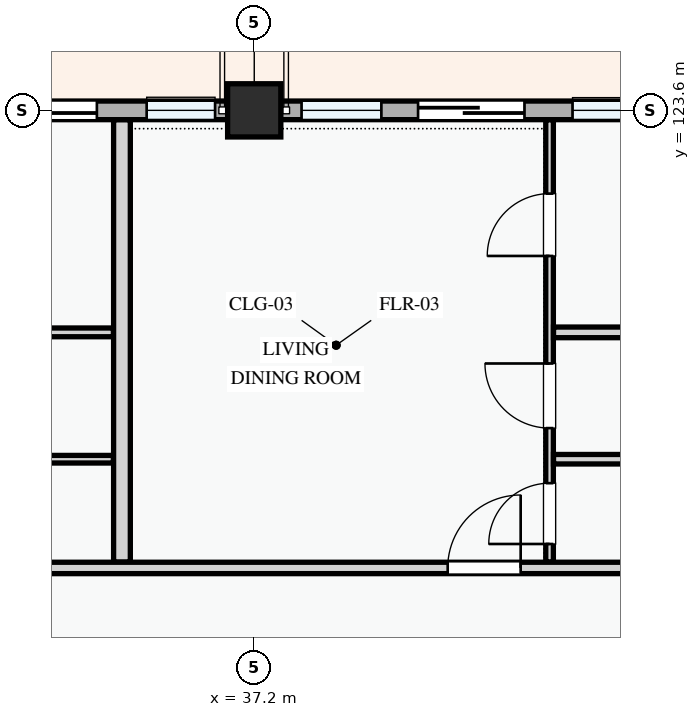
"""IFC4 building model, lengths in metres.
Left out: names, types, materials, properties, quantities, classifications, styles, units other than length and angle.
Written with IfcOpenShell. Run it as: python <this file> out.ifc"""

import sys

from ifc_helpers import new_model, si_unit, direction, frame, frame_2d, origin, origin_2d, place, context, subcontext, project, spatial, rectangle, extrude, element, fill, save


model = new_model("IFC4")
c1 = context("Model", 3, precision=1e-05, world=origin(), true_north=direction((0.0, 1.0)))
c2 = subcontext(c1, "Body", "Model", "MODEL_VIEW")
j1 = project(units=[si_unit("LENGTHUNIT", "METRE"), si_unit("PLANEANGLEUNIT", "RADIAN")], contexts=[c1])
p1 = place(None, origin())
s1 = spatial("IfcSite", under=j1, at=p1, CompositionType="ELEMENT")
p2 = place(p1, origin())
s2 = spatial("IfcBuilding", under=s1, at=p2, CompositionType="ELEMENT")
p3 = place(p2, frame((0.0, 0.0, 8.1)))
s3 = spatial("IfcBuildingStorey", under=s2, at=p3, CompositionType="ELEMENT", Elevation=8.1)
p4 = place(p3, frame((37.2, 123.6, 0.0), z_axis=(0.0, 0.0, 1.0), x_axis=(1.0, 0.0, 0.0)))
e1 = element("IfcColumn", 1, at=p4, inside=s3, PredefinedType="COLUMN", context=c2, shape_type="SweptSolid", body=[
    extrude(rectangle(XDim=0.7, YDim=0.7, at=origin_2d()), origin(), (0.0, 0.0, 1.0), 3.3),
])
p5 = place(p3, frame((43.2, 123.6, 0.0), z_axis=(0.0, 0.0, 1.0), x_axis=(-1.0, 0.0, 0.0)))
e2 = element("IfcWall", 2, at=p5, inside=s3, PredefinedType="STANDARD", context=c2, shape_type="SweptSolid", body=[
    extrude(rectangle(XDim=6.0, YDim=0.245, at=frame_2d((3.0, 0.0))), origin(), (0.0, 0.0, 1.0), 2.445),
])
p6 = place(p5, frame((2.444, 0.0, 0.0)))
e3 = element("IfcOpeningElement", 3, at=p6, cuts=e2, PredefinedType="OPENING", context=c2, shape_type="SweptSolid", body=[
    extrude(rectangle(XDim=1.4, YDim=2.2, at=frame_2d((0.7, 1.1))), frame((0.0, 0.133, 0.0), z_axis=(0.0, -1.0, 0.0), x_axis=(1.0, 0.0, 0.0)), (0.0, 0.0, 1.0), 0.265),
])
p7 = place(p5, frame((0.492, 0.0, 0.78)))
e4 = element("IfcOpeningElement", 4, at=p7, cuts=e2, PredefinedType="OPENING", context=c2, shape_type="SweptSolid", body=[
    extrude(rectangle(XDim=1.32, YDim=1.35, at=frame_2d((0.66, 0.675))), frame((0.0, 0.133, 0.0), z_axis=(0.0, -1.0, 0.0), x_axis=(1.0, 0.0, 0.0)), (0.0, 0.0, 1.0), 0.265),
])
p8 = place(p5, frame((4.327, 0.0, 0.78)))
e5 = element("IfcOpeningElement", 5, at=p8, cuts=e2, PredefinedType="OPENING", context=c2, shape_type="SweptSolid", body=[
    extrude(rectangle(XDim=1.05, YDim=1.2, at=frame_2d((0.525, 0.6))), frame((0.0, 0.133, 0.0), z_axis=(0.0, -1.0, 0.0), x_axis=(1.0, 0.0, 0.0)), (0.0, 0.0, 1.0), 0.265),
])
p9 = place(p3, frame((37.2, 123.6, 0.0), z_axis=(0.0, 0.0, 1.0), x_axis=(-1.0, 0.0, 0.0)))
e6 = element("IfcWall", 6, at=p9, inside=s3, PredefinedType="STANDARD", context=c2, shape_type="SweptSolid", body=[
    extrude(rectangle(XDim=8.4, YDim=0.245, at=frame_2d((4.2, 0.0))), origin(), (0.0, 0.0, 1.0), 2.345),
])
p10 = place(p9, frame((2.07, 0.0, 0.0)))
e7 = element("IfcOpeningElement", 7, at=p10, cuts=e6, PredefinedType="OPENING", context=c2, shape_type="SweptSolid", body=[
    extrude(rectangle(XDim=1.5, YDim=2.2, at=frame_2d((0.75, 1.1))), frame((0.0, 0.133, 0.0), z_axis=(0.0, -1.0, 0.0), x_axis=(1.0, 0.0, 0.0)), (0.0, 0.0, 1.0), 0.265),
])
p11 = place(p9, frame((0.515, 0.0, 0.78)))
e8 = element("IfcOpeningElement", 8, at=p11, cuts=e6, PredefinedType="OPENING", context=c2, shape_type="SweptSolid", body=[
    extrude(rectangle(XDim=0.9, YDim=1.2, at=frame_2d((0.45, 0.6))), frame((0.0, 0.133, 0.0), z_axis=(0.0, -1.0, 0.0), x_axis=(1.0, 0.0, 0.0)), (0.0, 0.0, 1.0), 0.265),
])
p12 = place(p9, frame((4.561, 0.0, 0.78)))
e9 = element("IfcOpeningElement", 9, at=p12, cuts=e6, PredefinedType="OPENING", context=c2, shape_type="SweptSolid", body=[
    extrude(rectangle(XDim=1.1, YDim=1.3, at=frame_2d((0.55, 0.65))), frame((0.0, 0.133, 0.0), z_axis=(0.0, -1.0, 0.0), x_axis=(1.0, 0.0, 0.0)), (0.0, 0.0, 1.0), 0.265),
])
p13 = place(p9, frame((6.906, 0.0, 0.78)))
e10 = element("IfcOpeningElement", 10, at=p13, cuts=e6, PredefinedType="OPENING", context=c2, shape_type="SweptSolid", body=[
    extrude(rectangle(XDim=1.0, YDim=1.25, at=frame_2d((0.5, 0.625))), frame((0.0, 0.133, 0.0), z_axis=(0.0, -1.0, 0.0), x_axis=(1.0, 0.0, 0.0)), (0.0, 0.0, 1.0), 0.265),
])
p14 = place(p3, frame((30.663, 120.679, 0.0), z_axis=(0.0, 0.0, 1.0), x_axis=(1.0, 0.0, 0.0)))
e11 = element("IfcWall", 11, at=p14, inside=s3, PredefinedType="PARTITIONING", context=c2, shape_type="SweptSolid", body=[
    extrude(rectangle(XDim=4.685, YDim=0.115, at=frame_2d((2.342, 0.0))), origin(), (0.0, 0.0, 1.0), 3.0),
])
p15 = place(p3, frame((30.663, 119.01, 0.0), z_axis=(0.0, 0.0, 1.0), x_axis=(1.0, 0.0, 0.0)))
e12 = element("IfcWall", 12, at=p15, inside=s3, PredefinedType="PARTITIONING", context=c2, shape_type="SweptSolid", body=[
    extrude(rectangle(XDim=4.685, YDim=0.1, at=frame_2d((2.342, 0.0))), origin(), (0.0, 0.0, 1.0), 3.0),
])
p16 = place(p3, frame((41.086, 117.657, 0.0), z_axis=(0.0, 0.0, 1.0), x_axis=(0.0, 1.0, 0.0)))
e13 = element("IfcWall", 13, at=p16, inside=s3, PredefinedType="PARTITIONING", context=c2, shape_type="SweptSolid", body=[
    extrude(rectangle(XDim=5.819, YDim=0.1, at=frame_2d((2.909, 0.0))), origin(), (0.0, 0.0, 1.0), 3.0),
])
p17 = place(p16, frame((0.238, 0.0, 0.0)))
e14 = element("IfcOpeningElement", 14, at=p17, cuts=e13, PredefinedType="OPENING", context=c2, shape_type="SweptSolid", body=[
    extrude(rectangle(XDim=0.8, YDim=2.1, at=frame_2d((0.4, 1.05))), frame((0.0, 0.06, 0.0), z_axis=(0.0, -1.0, 0.0), x_axis=(1.0, 0.0, 0.0)), (0.0, 0.0, 1.0), 0.12),
])
p18 = place(p16, frame((1.763, 0.0, 0.0)))
e15 = element("IfcOpeningElement", 15, at=p18, cuts=e13, PredefinedType="OPENING", context=c2, shape_type="SweptSolid", body=[
    extrude(rectangle(XDim=0.85, YDim=2.1, at=frame_2d((0.425, 1.05))), frame((0.0, 0.06, 0.0), z_axis=(0.0, -1.0, 0.0), x_axis=(1.0, 0.0, 0.0)), (0.0, 0.0, 1.0), 0.12),
])
p19 = place(p16, frame((4.028, 0.0, 0.0)))
e16 = element("IfcOpeningElement", 16, at=p19, cuts=e13, PredefinedType="OPENING", context=c2, shape_type="SweptSolid", body=[
    extrude(rectangle(XDim=0.82, YDim=2.08, at=frame_2d((0.41, 1.04))), frame((0.0, 0.06, 0.0), z_axis=(0.0, -1.0, 0.0), x_axis=(1.0, 0.0, 0.0)), (0.0, 0.0, 1.0), 0.12),
])
p20 = place(p3, frame((41.138, 120.679, 0.0), z_axis=(0.0, 0.0, 1.0), x_axis=(1.0, 0.0, 0.0)))
e17 = element("IfcWall", 17, at=p20, inside=s3, PredefinedType="PARTITIONING", context=c2, shape_type="SweptSolid", body=[
    extrude(rectangle(XDim=5.94, YDim=0.14, at=frame_2d((2.97, 0.0))), origin(), (0.0, 0.0, 1.0), 3.0),
])
p21 = place(p3, frame((41.138, 119.01, 0.0), z_axis=(0.0, 0.0, 1.0), x_axis=(1.0, 0.0, 0.0)))
e18 = element("IfcWall", 18, at=p21, inside=s3, PredefinedType="PARTITIONING", context=c2, shape_type="SweptSolid", body=[
    extrude(rectangle(XDim=5.94, YDim=0.125, at=frame_2d((2.97, 0.0))), origin(), (0.0, 0.0, 1.0), 3.0),
])
p22 = place(p3, frame((35.46, 117.657, 0.0), z_axis=(0.0, 0.0, 1.0), x_axis=(0.0, 1.0, 0.0)))
e19 = element("IfcWall", 19, at=p22, inside=s3, PredefinedType="PARTITIONING", context=c2, shape_type="SweptSolid", body=[
    extrude(rectangle(XDim=5.819, YDim=0.22, at=frame_2d((2.909, 0.0))), origin(), (0.0, 0.0, 1.0), 3.0),
])
p23 = place(p3, frame((22.66, 117.58, 0.0), z_axis=(0.0, 0.0, 1.0), x_axis=(1.0, 0.0, 0.0)))
e20 = element("IfcWall", 20, at=p23, inside=s3, PredefinedType="PARTITIONING", context=c2, shape_type="SweptSolid", body=[
    extrude(rectangle(XDim=34.816, YDim=0.15, at=frame_2d((17.408, 0.0))), origin(), (0.0, 0.0, 1.0), 3.0),
])
p24 = place(p23, frame((2.74, 0.0, 0.0)))
e21 = element("IfcOpeningElement", 21, at=p24, cuts=e20, PredefinedType="OPENING", context=c2, shape_type="SweptSolid", body=[
    extrude(rectangle(XDim=0.92, YDim=2.1, at=frame_2d((0.46, 1.05))), frame((0.0, 0.085, 0.0), z_axis=(0.0, -1.0, 0.0), x_axis=(1.0, 0.0, 0.0)), (0.0, 0.0, 1.0), 0.17),
])
p25 = place(p23, frame((17.085, 0.0, 0.0)))
e22 = element("IfcOpeningElement", 22, at=p25, cuts=e20, PredefinedType="OPENING", context=c2, shape_type="SweptSolid", body=[
    extrude(rectangle(XDim=0.96, YDim=2.12, at=frame_2d((0.48, 1.06))), frame((0.0, 0.085, 0.0), z_axis=(0.0, -1.0, 0.0), x_axis=(1.0, 0.0, 0.0)), (0.0, 0.0, 1.0), 0.17),
])
p26 = place(p23, frame((24.77, 0.0, 0.0)))
e23 = element("IfcOpeningElement", 23, at=p26, cuts=e20, PredefinedType="OPENING", context=c2, shape_type="SweptSolid", body=[
    extrude(rectangle(XDim=0.92, YDim=2.1, at=frame_2d((0.46, 1.05))), frame((0.0, 0.085, 0.0), z_axis=(0.0, -1.0, 0.0), x_axis=(1.0, 0.0, 0.0)), (0.0, 0.0, 1.0), 0.17),
])
p27 = place(p6, frame((1.4, 0.0, 0.0), z_axis=(0.0, 0.0, 1.0), x_axis=(-1.0, 0.0, 0.0)))
e24 = element("IfcDoor", 24, at=p27, inside=s3, OperationType="SLIDING_TO_LEFT", PredefinedType="DOOR", context=c2, shape_type="SweptSolid", body=[
    extrude(rectangle(XDim=1.4, YDim=2.2, at=frame_2d((0.7, 1.1))), frame((0.0, 0.025, 0.0), z_axis=(0.0, -1.0, 0.0), x_axis=(1.0, 0.0, 0.0)), (0.0, 0.0, 1.0), 0.05),
])
fill(e3, e24)
p28 = place(p7, origin())
e25 = element("IfcWindow", 25, at=p28, inside=s3, PartitioningType="SINGLE_PANEL", PredefinedType="WINDOW", context=c2, shape_type="SweptSolid", body=[
    extrude(rectangle(XDim=1.32, YDim=1.35, at=frame_2d((0.66, 0.675))), frame((0.0, 0.03, 0.0), z_axis=(0.0, -1.0, 0.0), x_axis=(1.0, 0.0, 0.0)), (0.0, 0.0, 1.0), 0.06),
])
fill(e4, e25)
p29 = place(p8, origin())
e26 = element("IfcWindow", 26, at=p29, inside=s3, PartitioningType="SINGLE_PANEL", PredefinedType="WINDOW", context=c2, shape_type="SweptSolid", body=[
    extrude(rectangle(XDim=1.05, YDim=1.2, at=frame_2d((0.525, 0.6))), frame((0.0, 0.03, 0.0), z_axis=(0.0, -1.0, 0.0), x_axis=(1.0, 0.0, 0.0)), (0.0, 0.0, 1.0), 0.06),
])
fill(e5, e26)
p30 = place(p10, frame((1.5, 0.0, 0.0), z_axis=(0.0, 0.0, 1.0), x_axis=(-1.0, 0.0, 0.0)))
e27 = element("IfcDoor", 27, at=p30, inside=s3, OperationType="SLIDING_TO_RIGHT", PredefinedType="DOOR", context=c2, shape_type="SweptSolid", body=[
    extrude(rectangle(XDim=1.5, YDim=2.2, at=frame_2d((0.75, 1.1))), frame((0.0, 0.025, 0.0), z_axis=(0.0, -1.0, 0.0), x_axis=(1.0, 0.0, 0.0)), (0.0, 0.0, 1.0), 0.05),
])
fill(e7, e27)
p31 = place(p11, origin())
e28 = element("IfcWindow", 28, at=p31, inside=s3, PartitioningType="SINGLE_PANEL", PredefinedType="WINDOW", context=c2, shape_type="SweptSolid", body=[
    extrude(rectangle(XDim=0.9, YDim=1.2, at=frame_2d((0.45, 0.6))), frame((0.0, 0.03, 0.0), z_axis=(0.0, -1.0, 0.0), x_axis=(1.0, 0.0, 0.0)), (0.0, 0.0, 1.0), 0.06),
])
fill(e8, e28)
p32 = place(p17, origin())
e29 = element("IfcDoor", 29, at=p32, inside=s3, OperationType="SINGLE_SWING_LEFT", PredefinedType="DOOR", context=c2, shape_type="SweptSolid", body=[
    extrude(rectangle(XDim=0.8, YDim=2.1, at=frame_2d((0.4, 1.05))), frame((0.0, 0.025, 0.0), z_axis=(0.0, -1.0, 0.0), x_axis=(1.0, 0.0, 0.0)), (0.0, 0.0, 1.0), 0.05),
])
fill(e14, e29)
p33 = place(p18, origin())
e30 = element("IfcDoor", 30, at=p33, inside=s3, OperationType="SINGLE_SWING_RIGHT", PredefinedType="DOOR", context=c2, shape_type="SweptSolid", body=[
    extrude(rectangle(XDim=0.85, YDim=2.1, at=frame_2d((0.425, 1.05))), frame((0.0, 0.025, 0.0), z_axis=(0.0, -1.0, 0.0), x_axis=(1.0, 0.0, 0.0)), (0.0, 0.0, 1.0), 0.05),
])
fill(e15, e30)
p34 = place(p19, origin())
e31 = element("IfcDoor", 31, at=p34, inside=s3, OperationType="SINGLE_SWING_LEFT", PredefinedType="DOOR", context=c2, shape_type="SweptSolid", body=[
    extrude(rectangle(XDim=0.82, YDim=2.08, at=frame_2d((0.41, 1.04))), frame((0.0, 0.025, 0.0), z_axis=(0.0, -1.0, 0.0), x_axis=(1.0, 0.0, 0.0)), (0.0, 0.0, 1.0), 0.05),
])
fill(e16, e31)
p35 = place(p25, origin())
e32 = element("IfcDoor", 32, at=p35, inside=s3, OperationType="SINGLE_SWING_RIGHT", PredefinedType="DOOR", context=c2, shape_type="SweptSolid", body=[
    extrude(rectangle(XDim=0.96, YDim=2.12, at=frame_2d((0.48, 1.06))), frame((0.0, 0.025, 0.0), z_axis=(0.0, -1.0, 0.0), x_axis=(1.0, 0.0, 0.0)), (0.0, 0.0, 1.0), 0.05),
])
fill(e22, e32)
save(model, sys.argv[1])
